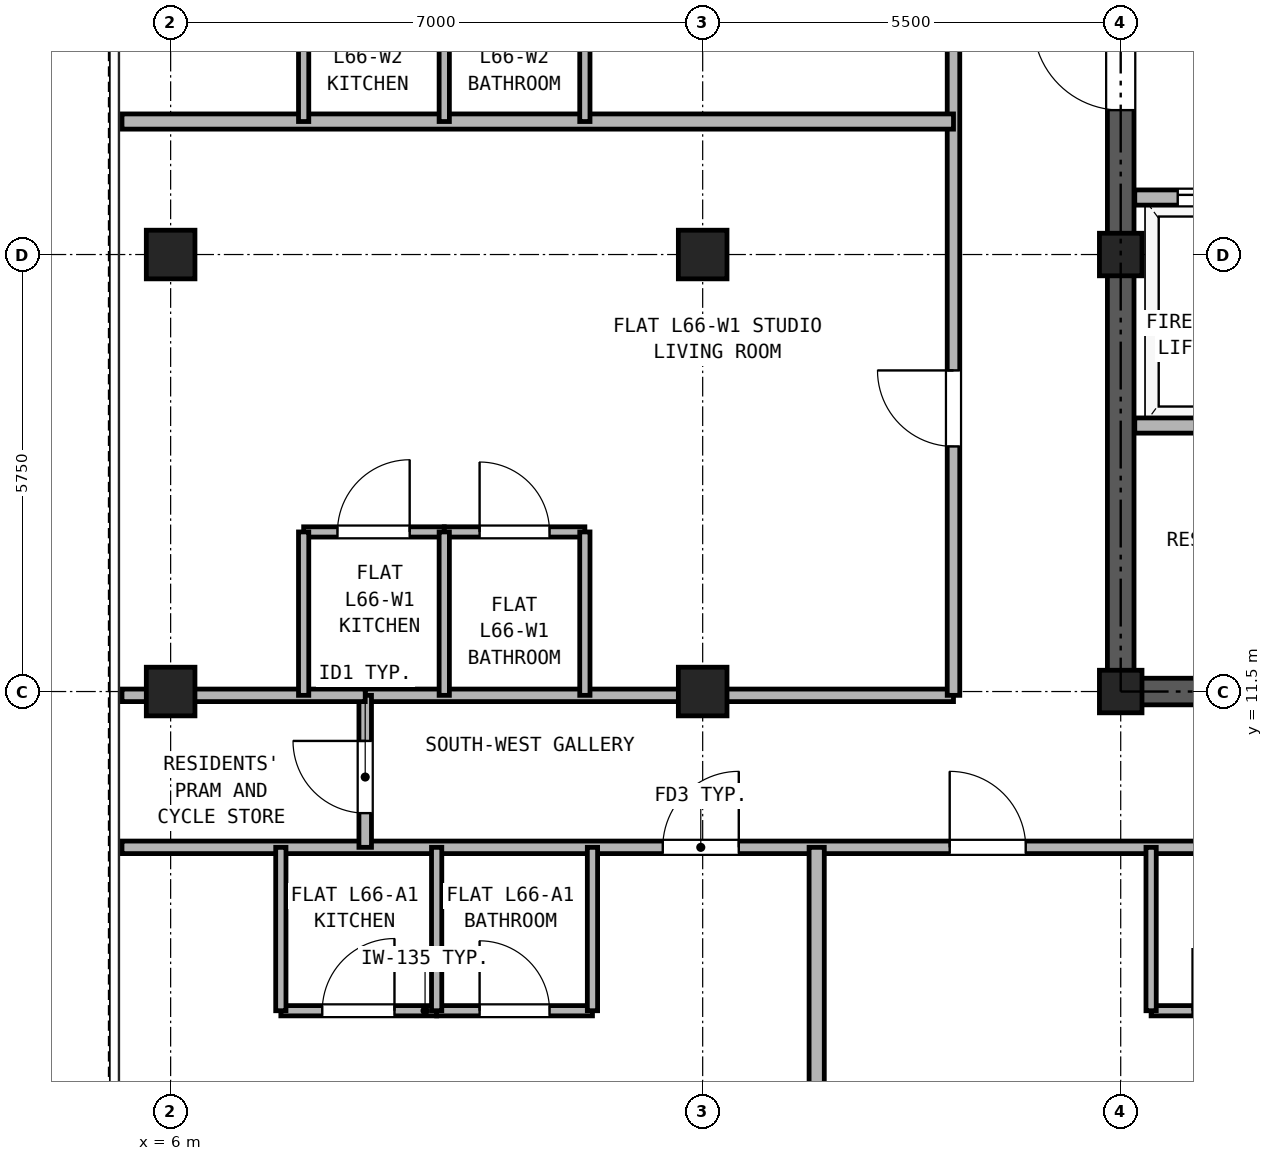
"""IFC4 building model, lengths in metres.
Left out: names, types, materials, properties, quantities, classifications, styles, units other than length and angle.
Written with IfcOpenShell. Run it as: python <this file> out.ifc"""

import sys

from ifc_helpers import new_model, si_unit, direction, frame, frame_2d, origin, origin_2d, place, context, subcontext, project, spatial, rectangle, hollow_rectangle, extrude, source, transform, mapped, element, fill, save


model = new_model("IFC4")
c1 = context("Model", 3, precision=1e-05, world=origin(), true_north=direction((0.0, 1.0)))
c2 = subcontext(c1, "Body", "Model", "MODEL_VIEW")
j1 = project(units=[si_unit("LENGTHUNIT", "METRE"), si_unit("PLANEANGLEUNIT", "RADIAN")], contexts=[c1])
p1 = place(None, origin())
s1 = spatial("IfcSite", under=j1, at=p1, CompositionType="ELEMENT")
p2 = place(p1, origin())
s2 = spatial("IfcBuilding", under=s1, at=p2, CompositionType="ELEMENT")
p3 = place(p2, frame((0.0, 0.0, 232.9)))
s3 = spatial("IfcBuildingStorey", under=s2, at=p3, CompositionType="ELEMENT", Elevation=232.9)
m1 = source(origin(), c2, "Body", "SweptSolid", [
    extrude(hollow_rectangle(XDim=0.64, YDim=0.64, WallThickness=0.035, at=origin_2d()), origin(), (0.0, 0.0, 1.0), 2.98),
])
for number, where, z_axis, x_axis in (
    (1, (6.0, 11.5, 0.0), (0.0, 0.0, 1.0), (1.0, 0.0, 0.0)),
    (2, (6.0, 17.25, 0.0), (0.0, 0.0, 1.0), (1.0, 0.0, 0.0)),
    (3, (13.0, 11.5, 0.0), (0.0, 0.0, 1.0), (1.0, 0.0, 0.0)),
    (4, (13.0, 17.25, 0.0), (0.0, 0.0, 1.0), (1.0, 0.0, 0.0)),
):
    element("IfcColumn", number, at=place(p3, frame(where, z_axis=z_axis, x_axis=x_axis)), inside=s3, PredefinedType="COLUMN", context=c2, shape_type="MappedRepresentation", body=[
        mapped(m1, transform((0.0, 0.0, 0.0), x_axis=(1.0, 0.0, 0.0), y_axis=(0.0, 1.0, 0.0), z_axis=(0.0, 0.0, 1.0), scale=1.0)),
    ])
m2 = source(origin(), c2, "Body", "SweptSolid", [
    extrude(hollow_rectangle(XDim=0.56, YDim=0.56, WallThickness=0.03, at=origin_2d()), origin(), (0.0, 0.0, 1.0), 2.98),
])
for number, where, z_axis, x_axis in (
    (5, (18.5, 11.5, 0.0), (0.0, 0.0, 1.0), (1.0, 0.0, 0.0)),
    (6, (18.5, 17.25, 0.0), (0.0, 0.0, 1.0), (1.0, 0.0, 0.0)),
):
    element("IfcColumn", number, at=place(p3, frame(where, z_axis=z_axis, x_axis=x_axis)), inside=s3, PredefinedType="COLUMN", context=c2, shape_type="MappedRepresentation", body=[
        mapped(m2, transform((0.0, 0.0, 0.0), x_axis=(1.0, 0.0, 0.0), y_axis=(0.0, 1.0, 0.0), z_axis=(0.0, 0.0, 1.0), scale=1.0)),
    ])
p4 = place(p3, frame((18.325, 11.5, 0.0), z_axis=(0.0, 0.0, 1.0), x_axis=(1.0, 0.0, 0.0)))
e7 = element("IfcWall", 7, at=p4, inside=s3, PredefinedType="SHEAR", context=c2, shape_type="SweptSolid", body=[
    extrude(rectangle(XDim=10.35, YDim=0.35, at=frame_2d((5.175, 0.0))), origin(), (0.0, 0.0, 1.0), 2.98),
])
p5 = place(p4, frame((1.775, 0.0, 0.0)))
e8 = element("IfcOpeningElement", 8, at=p5, cuts=e7, PredefinedType="OPENING", context=c2, shape_type="SweptSolid", body=[
    extrude(rectangle(XDim=0.95, YDim=2.15, at=frame_2d((0.475, 1.075))), frame((0.0, 0.185, 0.0), z_axis=(0.0, -1.0, 0.0), x_axis=(1.0, 0.0, 0.0)), (0.0, 0.0, 1.0), 0.37),
])
p6 = place(p4, frame((5.275, 0.0, 0.0)))
e9 = element("IfcOpeningElement", 9, at=p6, cuts=e7, PredefinedType="OPENING", context=c2, shape_type="SweptSolid", body=[
    extrude(rectangle(XDim=0.95, YDim=2.15, at=frame_2d((0.475, 1.075))), frame((0.0, 0.185, 0.0), z_axis=(0.0, -1.0, 0.0), x_axis=(1.0, 0.0, 0.0)), (0.0, 0.0, 1.0), 0.37),
])
p7 = place(p4, frame((8.175, 0.0, 0.0)))
e10 = element("IfcOpeningElement", 10, at=p7, cuts=e7, PredefinedType="OPENING", context=c2, shape_type="SweptSolid", body=[
    extrude(rectangle(XDim=1.1, YDim=2.25, at=frame_2d((0.55, 1.125))), frame((0.0, 0.185, 0.0), z_axis=(0.0, -1.0, 0.0), x_axis=(1.0, 0.0, 0.0)), (0.0, 0.0, 1.0), 0.37),
])
p8 = place(p3, frame((18.5, 11.675, 0.0), z_axis=(0.0, 0.0, 1.0), x_axis=(0.0, 1.0, 0.0)))
e11 = element("IfcWall", 11, at=p8, inside=s3, PredefinedType="SHEAR", context=c2, shape_type="SweptSolid", body=[
    extrude(rectangle(XDim=16.9, YDim=0.35, at=frame_2d((8.45, 0.0))), origin(), (0.0, 0.0, 1.0), 2.98),
])
p9 = place(p8, frame((7.475, 0.0, 0.0)))
e12 = element("IfcOpeningElement", 12, at=p9, cuts=e11, PredefinedType="OPENING", context=c2, shape_type="SweptSolid", body=[
    extrude(rectangle(XDim=1.15, YDim=2.2, at=frame_2d((0.575, 1.1))), frame((0.0, 0.185, 0.0), z_axis=(0.0, -1.0, 0.0), x_axis=(1.0, 0.0, 0.0)), (0.0, 0.0, 1.0), 0.37),
])
p10 = place(p3, frame((18.685, 18.0, 0.0), z_axis=(0.0, 0.0, 1.0), x_axis=(1.0, 0.0, 0.0)))
e13 = element("IfcWall", 13, at=p10, inside=s3, PredefinedType="PARTITIONING", context=c2, shape_type="SweptSolid", body=[
    extrude(rectangle(XDim=9.63, YDim=0.2, at=frame_2d((4.815, 0.0))), origin(), (0.0, 0.0, 1.0), 2.98),
])
p11 = place(p10, frame((0.565, 0.0, 0.0)))
e14 = element("IfcOpeningElement", 14, at=p11, cuts=e13, PredefinedType="OPENING", context=c2, shape_type="SweptSolid", body=[
    extrude(rectangle(XDim=1.3, YDim=2.3, at=frame_2d((0.65, 1.15))), frame((0.0, 0.11, 0.0), z_axis=(0.0, -1.0, 0.0), x_axis=(1.0, 0.0, 0.0)), (0.0, 0.0, 1.0), 0.22),
])
p12 = place(p10, frame((2.665, 0.0, 0.0)))
e15 = element("IfcOpeningElement", 15, at=p12, cuts=e13, PredefinedType="OPENING", context=c2, shape_type="SweptSolid", body=[
    extrude(rectangle(XDim=1.3, YDim=2.3, at=frame_2d((0.65, 1.15))), frame((0.0, 0.11, 0.0), z_axis=(0.0, -1.0, 0.0), x_axis=(1.0, 0.0, 0.0)), (0.0, 0.0, 1.0), 0.22),
])
p13 = place(p10, frame((7.165, 0.0, 0.0)))
e16 = element("IfcOpeningElement", 16, at=p13, cuts=e13, PredefinedType="OPENING", context=c2, shape_type="SweptSolid", body=[
    extrude(rectangle(XDim=1.0, YDim=2.15, at=frame_2d((0.5, 1.075))), frame((0.0, 0.11, 0.0), z_axis=(0.0, -1.0, 0.0), x_axis=(1.0, 0.0, 0.0)), (0.0, 0.0, 1.0), 0.22),
])
p14 = place(p3, frame((18.685, 15.0, 0.0), z_axis=(0.0, 0.0, 1.0), x_axis=(1.0, 0.0, 0.0)))
e17 = element("IfcWall", 17, at=p14, inside=s3, PredefinedType="PARTITIONING", context=c2, shape_type="SweptSolid", body=[
    extrude(rectangle(XDim=9.63, YDim=0.2, at=frame_2d((4.815, 0.0))), origin(), (0.0, 0.0, 1.0), 2.98),
])
p15 = place(p3, frame((5.36, 9.45, 0.0), z_axis=(0.0, 0.0, 1.0), x_axis=(1.0, 0.0, 0.0)))
e18 = element("IfcWall", 18, at=p15, inside=s3, PredefinedType="PARTITIONING", context=c2, shape_type="SweptSolid", body=[
    extrude(rectangle(XDim=36.28, YDim=0.165, at=frame_2d((18.14, 0.0))), origin(), (0.0, 0.0, 1.0), 2.98),
])
p16 = place(p15, frame((7.115, 0.0, 0.0)))
e19 = element("IfcOpeningElement", 19, at=p16, cuts=e18, PredefinedType="OPENING", context=c2, shape_type="SweptSolid", body=[
    extrude(rectangle(XDim=1.0, YDim=2.15, at=frame_2d((0.5, 1.075))), frame((0.0, 0.093, 0.0), z_axis=(0.0, -1.0, 0.0), x_axis=(1.0, 0.0, 0.0)), (0.0, 0.0, 1.0), 0.185),
])
p17 = place(p15, frame((10.89, 0.0, 0.0)))
e20 = element("IfcOpeningElement", 20, at=p17, cuts=e18, PredefinedType="OPENING", context=c2, shape_type="SweptSolid", body=[
    extrude(rectangle(XDim=1.0, YDim=2.15, at=frame_2d((0.5, 1.075))), frame((0.0, 0.093, 0.0), z_axis=(0.0, -1.0, 0.0), x_axis=(1.0, 0.0, 0.0)), (0.0, 0.0, 1.0), 0.185),
])
p18 = place(p15, frame((23.64, 0.0, 0.0)))
e21 = element("IfcOpeningElement", 21, at=p18, cuts=e18, PredefinedType="OPENING", context=c2, shape_type="SweptSolid", body=[
    extrude(rectangle(XDim=1.0, YDim=2.15, at=frame_2d((0.5, 1.075))), frame((0.0, 0.093, 0.0), z_axis=(0.0, -1.0, 0.0), x_axis=(1.0, 0.0, 0.0)), (0.0, 0.0, 1.0), 0.185),
])
p19 = place(p15, frame((27.915, 0.0, 0.0)))
e22 = element("IfcOpeningElement", 22, at=p19, cuts=e18, PredefinedType="OPENING", context=c2, shape_type="SweptSolid", body=[
    extrude(rectangle(XDim=1.0, YDim=2.15, at=frame_2d((0.5, 1.075))), frame((0.0, 0.093, 0.0), z_axis=(0.0, -1.0, 0.0), x_axis=(1.0, 0.0, 0.0)), (0.0, 0.0, 1.0), 0.185),
])
p20 = place(p3, frame((8.56, 11.45, 0.0), z_axis=(0.0, 0.0, 1.0), x_axis=(1.0, 0.0, 0.0)))
e23 = element("IfcWall", 23, at=p20, inside=s3, PredefinedType="PARTITIONING", context=c2, shape_type="SweptSolid", body=[
    extrude(rectangle(XDim=7.74, YDim=0.165, at=frame_2d((3.87, 0.0))), origin(), (0.0, 0.0, 1.0), 2.428),
])
p21 = place(p3, frame((8.56, 9.45, 0.0), z_axis=(0.0, 0.0, 1.0), x_axis=(0.0, 1.0, 0.0)))
e24 = element("IfcWall", 24, at=p21, inside=s3, PredefinedType="PARTITIONING", context=c2, shape_type="SweptSolid", body=[
    extrude(rectangle(XDim=2.0, YDim=0.165, at=frame_2d((1.0, 0.0))), origin(), (0.0, 0.0, 1.0), 2.98),
])
p22 = place(p21, frame((0.45, 0.0, 0.0)))
e25 = element("IfcOpeningElement", 25, at=p22, cuts=e24, PredefinedType="OPENING", context=c2, shape_type="SweptSolid", body=[
    extrude(rectangle(XDim=0.95, YDim=2.15, at=frame_2d((0.475, 1.075))), frame((0.0, 0.093, 0.0), z_axis=(0.0, -1.0, 0.0), x_axis=(1.0, 0.0, 0.0)), (0.0, 0.0, 1.0), 0.185),
])
p23 = place(p3, frame((16.3, 11.45, 0.0), z_axis=(0.0, 0.0, 1.0), x_axis=(0.0, 1.0, 0.0)))
e26 = element("IfcWall", 26, at=p23, inside=s3, PredefinedType="PARTITIONING", context=c2, shape_type="SweptSolid", body=[
    extrude(rectangle(XDim=23.69, YDim=0.165, at=frame_2d((11.845, 0.0))), origin(), (0.0, 0.0, 1.0), 2.98),
])
p24 = place(p23, frame((3.275, 0.0, 0.0)))
e27 = element("IfcOpeningElement", 27, at=p24, cuts=e26, PredefinedType="OPENING", context=c2, shape_type="SweptSolid", body=[
    extrude(rectangle(XDim=1.0, YDim=2.15, at=frame_2d((0.5, 1.075))), frame((0.0, 0.093, 0.0), z_axis=(0.0, -1.0, 0.0), x_axis=(1.0, 0.0, 0.0)), (0.0, 0.0, 1.0), 0.185),
])
p25 = place(p23, frame((11.15, 0.0, 0.0)))
e28 = element("IfcOpeningElement", 28, at=p25, cuts=e26, PredefinedType="OPENING", context=c2, shape_type="SweptSolid", body=[
    extrude(rectangle(XDim=1.0, YDim=2.15, at=frame_2d((0.5, 1.075))), frame((0.0, 0.093, 0.0), z_axis=(0.0, -1.0, 0.0), x_axis=(1.0, 0.0, 0.0)), (0.0, 0.0, 1.0), 0.185),
])
p26 = place(p23, frame((16.925, 0.0, 0.0)))
e29 = element("IfcOpeningElement", 29, at=p26, cuts=e26, PredefinedType="OPENING", context=c2, shape_type="SweptSolid", body=[
    extrude(rectangle(XDim=1.0, YDim=2.15, at=frame_2d((0.5, 1.075))), frame((0.0, 0.093, 0.0), z_axis=(0.0, -1.0, 0.0), x_axis=(1.0, 0.0, 0.0)), (0.0, 0.0, 1.0), 0.185),
])
p27 = place(p3, frame((7.45, 7.3, 0.0), z_axis=(0.0, 0.0, 1.0), x_axis=(1.0, 0.0, 0.0)))
e30 = element("IfcWall", 30, at=p27, inside=s3, PredefinedType="PARTITIONING", context=c2, shape_type="SweptSolid", body=[
    extrude(rectangle(XDim=2.05, YDim=0.135, at=frame_2d((1.025, 0.0))), origin(), (0.0, 0.0, 1.0), 2.98),
])
p28 = place(p27, frame((0.545, 0.0, 0.0)))
e31 = element("IfcOpeningElement", 31, at=p28, cuts=e30, PredefinedType="OPENING", context=c2, shape_type="SweptSolid", body=[
    extrude(rectangle(XDim=0.95, YDim=2.15, at=frame_2d((0.475, 1.075))), frame((0.0, 0.077, 0.0), z_axis=(0.0, -1.0, 0.0), x_axis=(1.0, 0.0, 0.0)), (0.0, 0.0, 1.0), 0.155),
])
p29 = place(p3, frame((9.5, 7.3, 0.0), z_axis=(0.0, 0.0, 1.0), x_axis=(1.0, 0.0, 0.0)))
e32 = element("IfcWall", 32, at=p29, inside=s3, PredefinedType="PARTITIONING", context=c2, shape_type="SweptSolid", body=[
    extrude(rectangle(XDim=2.05, YDim=0.135, at=frame_2d((1.025, 0.0))), origin(), (0.0, 0.0, 1.0), 2.98),
])
p30 = place(p29, frame((0.565, 0.0, 0.0)))
e33 = element("IfcOpeningElement", 33, at=p30, cuts=e32, PredefinedType="OPENING", context=c2, shape_type="SweptSolid", body=[
    extrude(rectangle(XDim=0.92, YDim=2.1, at=frame_2d((0.46, 1.05))), frame((0.0, 0.077, 0.0), z_axis=(0.0, -1.0, 0.0), x_axis=(1.0, 0.0, 0.0)), (0.0, 0.0, 1.0), 0.155),
])
for number, where, z_axis, x_axis in (
    (34, (7.45, 7.3, 0.0), (0.0, 0.0, 1.0), (0.0, 1.0, 0.0)),
    (35, (9.5, 7.3, 0.0), (0.0, 0.0, 1.0), (0.0, 1.0, 0.0)),
    (36, (11.55, 7.3, 0.0), (0.0, 0.0, 1.0), (0.0, 1.0, 0.0)),
):
    element("IfcWall", number, at=place(p3, frame(where, z_axis=z_axis, x_axis=x_axis)), inside=s3, PredefinedType="PARTITIONING", context=c2, shape_type="SweptSolid", body=[
        extrude(rectangle(XDim=2.15, YDim=0.135, at=frame_2d((1.075, 0.0))), origin(), (0.0, 0.0, 1.0), 2.98),
    ])
p31 = place(p3, frame((14.5, 0.16, 0.0), z_axis=(0.0, 0.0, 1.0), x_axis=(0.0, 1.0, 0.0)))
e37 = element("IfcWall", 37, at=p31, inside=s3, PredefinedType="PARTITIONING", context=c2, shape_type="SweptSolid", body=[
    extrude(rectangle(XDim=9.29, YDim=0.2, at=frame_2d((4.645, 0.0))), origin(), (0.0, 0.0, 1.0), 2.98),
])
p32 = place(p3, frame((18.9, 7.3, 0.0), z_axis=(0.0, 0.0, 1.0), x_axis=(1.0, 0.0, 0.0)))
e38 = element("IfcWall", 38, at=p32, inside=s3, PredefinedType="PARTITIONING", context=c2, shape_type="SweptSolid", body=[
    extrude(rectangle(XDim=2.05, YDim=0.135, at=frame_2d((1.025, 0.0))), origin(), (0.0, 0.0, 1.0), 2.98),
])
p33 = place(p32, frame((0.545, 0.0, 0.0)))
e39 = element("IfcOpeningElement", 39, at=p33, cuts=e38, PredefinedType="OPENING", context=c2, shape_type="SweptSolid", body=[
    extrude(rectangle(XDim=0.95, YDim=2.15, at=frame_2d((0.475, 1.075))), frame((0.0, 0.077, 0.0), z_axis=(0.0, -1.0, 0.0), x_axis=(1.0, 0.0, 0.0)), (0.0, 0.0, 1.0), 0.155),
])
p34 = place(p3, frame((18.9, 7.3, 0.0), z_axis=(0.0, 0.0, 1.0), x_axis=(0.0, 1.0, 0.0)))
e40 = element("IfcWall", 40, at=p34, inside=s3, PredefinedType="PARTITIONING", context=c2, shape_type="SweptSolid", body=[
    extrude(rectangle(XDim=2.15, YDim=0.135, at=frame_2d((1.075, 0.0))), origin(), (0.0, 0.0, 1.0), 2.98),
])
p35 = place(p3, frame((5.36, 11.45, 0.0), z_axis=(0.0, 0.0, 1.0), x_axis=(1.0, 0.0, 0.0)))
e41 = element("IfcWall", 41, at=p35, inside=s3, PredefinedType="PARTITIONING", context=c2, shape_type="SweptSolid", body=[
    extrude(rectangle(XDim=3.2, YDim=0.165, at=frame_2d((1.6, 0.0))), origin(), (0.0, 0.0, 1.0), 2.428),
])
p36 = place(p3, frame((7.75, 13.6, 0.0), z_axis=(0.0, 0.0, 1.0), x_axis=(1.0, 0.0, 0.0)))
e42 = element("IfcWall", 42, at=p36, inside=s3, PredefinedType="PARTITIONING", context=c2, shape_type="SweptSolid", body=[
    extrude(rectangle(XDim=1.85, YDim=0.135, at=frame_2d((0.925, 0.0))), origin(), (0.0, 0.0, 1.0), 2.98),
])
p37 = place(p36, frame((0.445, 0.0, 0.0)))
e43 = element("IfcOpeningElement", 43, at=p37, cuts=e42, PredefinedType="OPENING", context=c2, shape_type="SweptSolid", body=[
    extrude(rectangle(XDim=0.95, YDim=2.15, at=frame_2d((0.475, 1.075))), frame((0.0, 0.077, 0.0), z_axis=(0.0, -1.0, 0.0), x_axis=(1.0, 0.0, 0.0)), (0.0, 0.0, 1.0), 0.155),
])
p38 = place(p3, frame((9.6, 13.6, 0.0), z_axis=(0.0, 0.0, 1.0), x_axis=(1.0, 0.0, 0.0)))
e44 = element("IfcWall", 44, at=p38, inside=s3, PredefinedType="PARTITIONING", context=c2, shape_type="SweptSolid", body=[
    extrude(rectangle(XDim=1.85, YDim=0.135, at=frame_2d((0.925, 0.0))), origin(), (0.0, 0.0, 1.0), 2.98),
])
p39 = place(p38, frame((0.465, 0.0, 0.0)))
e45 = element("IfcOpeningElement", 45, at=p39, cuts=e44, PredefinedType="OPENING", context=c2, shape_type="SweptSolid", body=[
    extrude(rectangle(XDim=0.92, YDim=2.1, at=frame_2d((0.46, 1.05))), frame((0.0, 0.077, 0.0), z_axis=(0.0, -1.0, 0.0), x_axis=(1.0, 0.0, 0.0)), (0.0, 0.0, 1.0), 0.155),
])
for number, where, z_axis, x_axis in (
    (46, (7.75, 11.45, 0.0), (0.0, 0.0, 1.0), (0.0, 1.0, 0.0)),
    (47, (9.6, 11.45, 0.0), (0.0, 0.0, 1.0), (0.0, 1.0, 0.0)),
    (48, (11.45, 11.45, 0.0), (0.0, 0.0, 1.0), (0.0, 1.0, 0.0)),
):
    element("IfcWall", number, at=place(p3, frame(where, z_axis=z_axis, x_axis=x_axis)), inside=s3, PredefinedType="PARTITIONING", context=c2, shape_type="SweptSolid", body=[
        extrude(rectangle(XDim=2.15, YDim=0.135, at=frame_2d((1.075, 0.0))), origin(), (0.0, 0.0, 1.0), 2.98),
    ])
p40 = place(p3, frame((5.36, 19.0, 0.0), z_axis=(0.0, 0.0, 1.0), x_axis=(1.0, 0.0, 0.0)))
e49 = element("IfcWall", 49, at=p40, inside=s3, PredefinedType="PARTITIONING", context=c2, shape_type="SweptSolid", body=[
    extrude(rectangle(XDim=10.94, YDim=0.2, at=frame_2d((5.47, 0.0))), origin(), (0.0, 0.0, 1.0), 2.98),
])
for number, where, z_axis, x_axis in (
    (50, (7.75, 19.0, 0.0), (0.0, 0.0, 1.0), (0.0, 1.0, 0.0)),
    (51, (9.6, 19.0, 0.0), (0.0, 0.0, 1.0), (0.0, 1.0, 0.0)),
    (52, (11.45, 19.0, 0.0), (0.0, 0.0, 1.0), (0.0, 1.0, 0.0)),
):
    element("IfcWall", number, at=place(p3, frame(where, z_axis=z_axis, x_axis=x_axis)), inside=s3, PredefinedType="PARTITIONING", context=c2, shape_type="SweptSolid", body=[
        extrude(rectangle(XDim=2.15, YDim=0.135, at=frame_2d((1.075, 0.0))), origin(), (0.0, 0.0, 1.0), 2.98),
    ])
p41 = place(p11, origin())
e53 = element("IfcDoor", 53, at=p41, inside=s3, OperationType="DOUBLE_DOOR_SLIDING", PredefinedType="DOOR", context=c2, shape_type="SweptSolid", body=[
    extrude(rectangle(XDim=1.3, YDim=2.3, at=frame_2d((0.65, 1.15))), frame((0.0, 0.025, 0.0), z_axis=(0.0, -1.0, 0.0), x_axis=(1.0, 0.0, 0.0)), (0.0, 0.0, 1.0), 0.05),
])
fill(e14, e53)
p42 = place(p9, frame((1.15, 0.0, 0.0), z_axis=(0.0, 0.0, 1.0), x_axis=(-1.0, 0.0, 0.0)))
e54 = element("IfcDoor", 54, at=p42, inside=s3, OperationType="SINGLE_SWING_RIGHT", PredefinedType="DOOR", context=c2, shape_type="SweptSolid", body=[
    extrude(rectangle(XDim=1.15, YDim=2.2, at=frame_2d((0.575, 1.1))), frame((0.0, 0.025, 0.0), z_axis=(0.0, -1.0, 0.0), x_axis=(1.0, 0.0, 0.0)), (0.0, 0.0, 1.0), 0.05),
])
fill(e12, e54)
p43 = place(p28, origin())
e55 = element("IfcDoor", 55, at=p43, inside=s3, OperationType="SINGLE_SWING_RIGHT", PredefinedType="DOOR", context=c2, shape_type="SweptSolid", body=[
    extrude(rectangle(XDim=0.95, YDim=2.15, at=frame_2d((0.475, 1.075))), frame((0.0, 0.025, 0.0), z_axis=(0.0, -1.0, 0.0), x_axis=(1.0, 0.0, 0.0)), (0.0, 0.0, 1.0), 0.05),
])
fill(e31, e55)
p44 = place(p30, origin())
e56 = element("IfcDoor", 56, at=p44, inside=s3, OperationType="SINGLE_SWING_LEFT", PredefinedType="DOOR", context=c2, shape_type="SweptSolid", body=[
    extrude(rectangle(XDim=0.92, YDim=2.1, at=frame_2d((0.46, 1.05))), frame((0.0, 0.025, 0.0), z_axis=(0.0, -1.0, 0.0), x_axis=(1.0, 0.0, 0.0)), (0.0, 0.0, 1.0), 0.05),
])
fill(e33, e56)
p45 = place(p16, frame((1.0, 0.0, 0.0), z_axis=(0.0, 0.0, 1.0), x_axis=(-1.0, 0.0, 0.0)))
e57 = element("IfcDoor", 57, at=p45, inside=s3, OperationType="SINGLE_SWING_RIGHT", PredefinedType="DOOR", context=c2, shape_type="SweptSolid", body=[
    extrude(rectangle(XDim=1.0, YDim=2.15, at=frame_2d((0.5, 1.075))), frame((0.0, 0.025, 0.0), z_axis=(0.0, -1.0, 0.0), x_axis=(1.0, 0.0, 0.0)), (0.0, 0.0, 1.0), 0.05),
])
fill(e19, e57)
p46 = place(p33, origin())
e58 = element("IfcDoor", 58, at=p46, inside=s3, OperationType="SINGLE_SWING_LEFT", PredefinedType="DOOR", context=c2, shape_type="SweptSolid", body=[
    extrude(rectangle(XDim=0.95, YDim=2.15, at=frame_2d((0.475, 1.075))), frame((0.0, 0.025, 0.0), z_axis=(0.0, -1.0, 0.0), x_axis=(1.0, 0.0, 0.0)), (0.0, 0.0, 1.0), 0.05),
])
fill(e39, e58)
p47 = place(p17, frame((1.0, 0.0, 0.0), z_axis=(0.0, 0.0, 1.0), x_axis=(-1.0, 0.0, 0.0)))
e59 = element("IfcDoor", 59, at=p47, inside=s3, OperationType="SINGLE_SWING_LEFT", PredefinedType="DOOR", context=c2, shape_type="SweptSolid", body=[
    extrude(rectangle(XDim=1.0, YDim=2.15, at=frame_2d((0.5, 1.075))), frame((0.0, 0.025, 0.0), z_axis=(0.0, -1.0, 0.0), x_axis=(1.0, 0.0, 0.0)), (0.0, 0.0, 1.0), 0.05),
])
fill(e20, e59)
p48 = place(p22, frame((0.95, 0.0, 0.0), z_axis=(0.0, 0.0, 1.0), x_axis=(-1.0, 0.0, 0.0)))
e60 = element("IfcDoor", 60, at=p48, inside=s3, OperationType="SINGLE_SWING_RIGHT", PredefinedType="DOOR", context=c2, shape_type="SweptSolid", body=[
    extrude(rectangle(XDim=0.95, YDim=2.15, at=frame_2d((0.475, 1.075))), frame((0.0, 0.025, 0.0), z_axis=(0.0, -1.0, 0.0), x_axis=(1.0, 0.0, 0.0)), (0.0, 0.0, 1.0), 0.05),
])
fill(e25, e60)
p49 = place(p37, origin())
e61 = element("IfcDoor", 61, at=p49, inside=s3, OperationType="SINGLE_SWING_RIGHT", PredefinedType="DOOR", context=c2, shape_type="SweptSolid", body=[
    extrude(rectangle(XDim=0.95, YDim=2.15, at=frame_2d((0.475, 1.075))), frame((0.0, 0.025, 0.0), z_axis=(0.0, -1.0, 0.0), x_axis=(1.0, 0.0, 0.0)), (0.0, 0.0, 1.0), 0.05),
])
fill(e43, e61)
p50 = place(p39, origin())
e62 = element("IfcDoor", 62, at=p50, inside=s3, OperationType="SINGLE_SWING_LEFT", PredefinedType="DOOR", context=c2, shape_type="SweptSolid", body=[
    extrude(rectangle(XDim=0.92, YDim=2.1, at=frame_2d((0.46, 1.05))), frame((0.0, 0.025, 0.0), z_axis=(0.0, -1.0, 0.0), x_axis=(1.0, 0.0, 0.0)), (0.0, 0.0, 1.0), 0.05),
])
fill(e45, e62)
p51 = place(p24, origin())
e63 = element("IfcDoor", 63, at=p51, inside=s3, OperationType="SINGLE_SWING_RIGHT", PredefinedType="DOOR", context=c2, shape_type="SweptSolid", body=[
    extrude(rectangle(XDim=1.0, YDim=2.15, at=frame_2d((0.5, 1.075))), frame((0.0, 0.025, 0.0), z_axis=(0.0, -1.0, 0.0), x_axis=(1.0, 0.0, 0.0)), (0.0, 0.0, 1.0), 0.05),
])
fill(e27, e63)
save(model, sys.argv[1])
